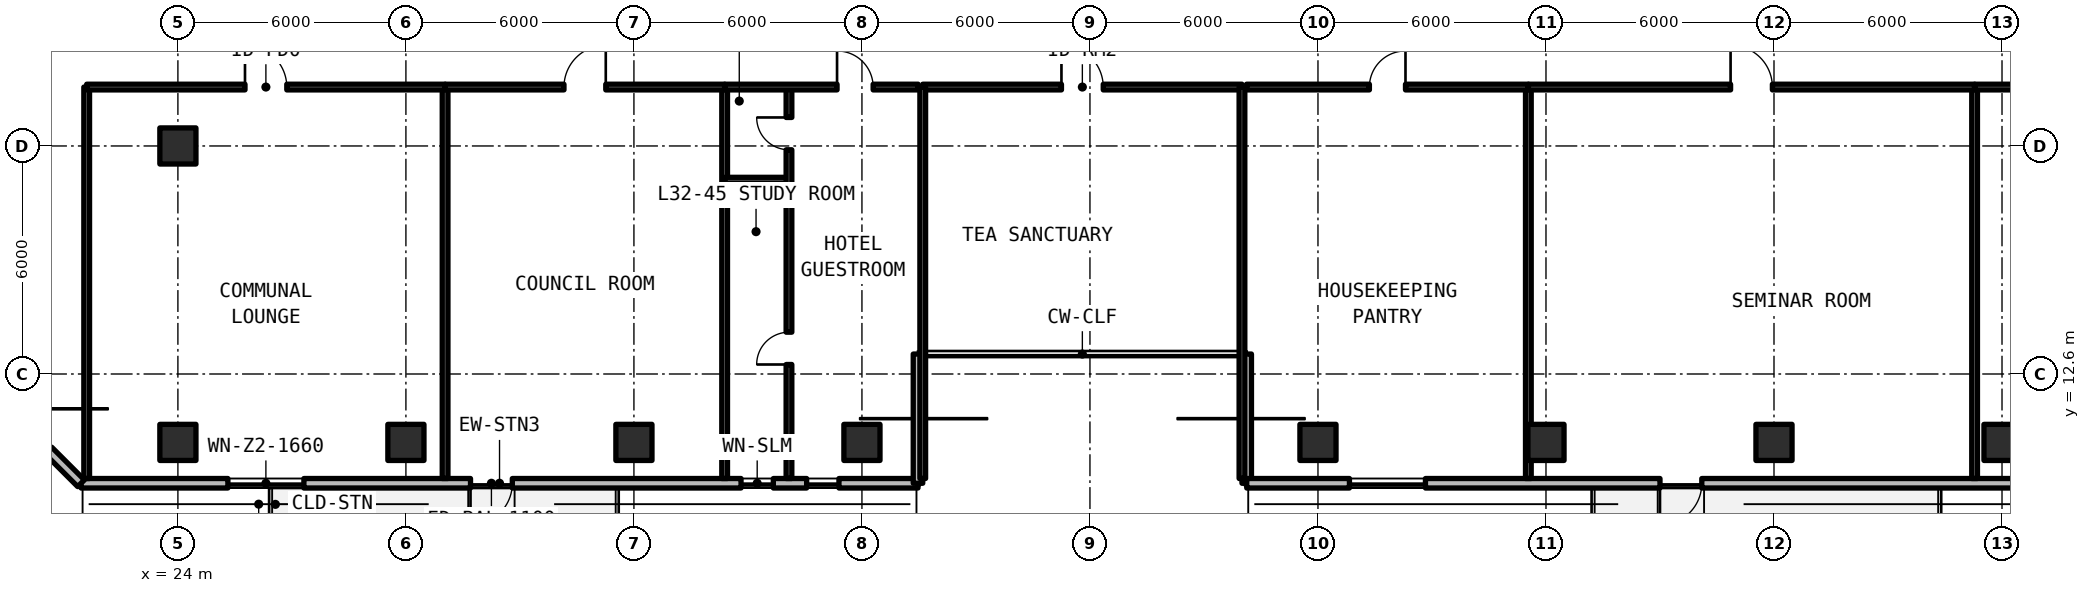
"""IFC4 building model, lengths in metres.
Left out: names, types, materials, properties, quantities, classifications, styles, units other than length and angle.
Written with IfcOpenShell. Run it as: python <this file> out.ifc"""

import sys

from ifc_helpers import new_model, si_unit, direction, frame, frame_2d, origin, origin_2d, place, context, subcontext, project, spatial, rectangle, extrude, element, fill, save


model = new_model("IFC4")
c1 = context("Model", 3, precision=1e-05, world=origin(), true_north=direction((0.0, 1.0)))
c2 = subcontext(c1, "Body", "Model", "MODEL_VIEW")
j1 = project(units=[si_unit("LENGTHUNIT", "METRE"), si_unit("PLANEANGLEUNIT", "RADIAN")], contexts=[c1])
p1 = place(None, origin())
s1 = spatial("IfcSite", under=j1, at=p1, CompositionType="ELEMENT")
p2 = place(p1, origin())
s2 = spatial("IfcBuilding", under=s1, at=p2, CompositionType="ELEMENT")
p3 = place(p2, frame((0.0, 0.0, 115.83)))
s3 = spatial("IfcBuildingStorey", under=s2, at=p3, CompositionType="ELEMENT", Elevation=115.83)
for number, where, z_axis, x_axis in (
    (1, (24.0, 18.6, 0.0), (0.0, 0.0, 1.0), (1.0, 0.0, 0.0)),
    (2, (24.0, 10.8, 0.0), (0.0, 0.0, 1.0), (1.0, 0.0, 0.0)),
    (3, (30.0, 10.8, 0.0), (0.0, 0.0, 1.0), (1.0, 0.0, 0.0)),
    (4, (36.0, 10.8, 0.0), (0.0, 0.0, 1.0), (1.0, 0.0, 0.0)),
    (5, (42.0, 10.8, 0.0), (0.0, 0.0, 1.0), (1.0, 0.0, 0.0)),
    (6, (54.0, 10.8, 0.0), (0.0, 0.0, 1.0), (1.0, 0.0, 0.0)),
    (7, (60.0, 10.8, 0.0), (0.0, 0.0, 1.0), (1.0, 0.0, 0.0)),
    (8, (66.0, 10.8, 0.0), (0.0, 0.0, 1.0), (1.0, 0.0, 0.0)),
    (9, (72.0, 10.8, 0.0), (0.0, 0.0, 1.0), (1.0, 0.0, 0.0)),
):
    element("IfcColumn", number, at=place(p3, frame(where, z_axis=z_axis, x_axis=x_axis)), inside=s3, PredefinedType="COLUMN", context=c2, shape_type="SweptSolid", body=[
        extrude(rectangle(XDim=0.95, YDim=0.95, at=origin_2d()), origin(), (0.0, 0.0, 1.0), 3.63),
    ])
p4 = place(p3, frame((21.452, 9.725, 0.0), z_axis=(0.0, 0.0, 1.0), x_axis=(1.0, 0.0, 0.0)))
e10 = element("IfcWall", 10, at=p4, inside=s3, PredefinedType="SOLIDWALL", context=c2, shape_type="SweptSolid", body=[
    extrude(rectangle(XDim=22.023, YDim=0.25, at=frame_2d((11.012, 0.0))), origin(), (0.0, 0.0, 1.0), 3.41),
])
p5 = place(p4, frame((10.248, 0.0, 0.0)))
e11 = element("IfcOpeningElement", 11, at=p5, cuts=e10, PredefinedType="OPENING", context=c2, shape_type="SweptSolid", body=[
    extrude(rectangle(XDim=1.1, YDim=2.15, at=frame_2d((0.55, 1.075))), frame((0.0, 0.135, 0.0), z_axis=(0.0, -1.0, 0.0), x_axis=(1.0, 0.0, 0.0)), (0.0, 0.0, 1.0), 0.27),
])
p6 = place(p4, frame((3.864, 0.0, 0.78)))
e12 = element("IfcOpeningElement", 12, at=p6, cuts=e10, PredefinedType="OPENING", context=c2, shape_type="SweptSolid", body=[
    extrude(rectangle(XDim=2.0, YDim=1.66, at=frame_2d((1.0, 0.83))), frame((0.0, 0.135, 0.0), z_axis=(0.0, -1.0, 0.0), x_axis=(1.0, 0.0, 0.0)), (0.0, 0.0, 1.0), 0.27),
])
p7 = place(p4, frame((17.367, 0.0, 0.78)))
e13 = element("IfcOpeningElement", 13, at=p7, cuts=e10, PredefinedType="OPENING", context=c2, shape_type="SweptSolid", body=[
    extrude(rectangle(XDim=0.85, YDim=1.65, at=frame_2d((0.425, 0.825))), frame((0.0, 0.135, 0.0), z_axis=(0.0, -1.0, 0.0), x_axis=(1.0, 0.0, 0.0)), (0.0, 0.0, 1.0), 0.27),
])
p8 = place(p4, frame((19.093, 0.0, 0.78)))
e14 = element("IfcOpeningElement", 14, at=p8, cuts=e10, PredefinedType="OPENING", context=c2, shape_type="SweptSolid", body=[
    extrude(rectangle(XDim=0.85, YDim=1.65, at=frame_2d((0.425, 0.825))), frame((0.0, 0.135, 0.0), z_axis=(0.0, -1.0, 0.0), x_axis=(1.0, 0.0, 0.0)), (0.0, 0.0, 1.0), 0.27),
])
for number, where, z_axis, x_axis in (
    (15, (43.475, 9.725, 0.0), (0.0, 0.0, 1.0), (0.0, 1.0, 0.0)),
    (16, (52.125, 13.125, 0.0), (0.0, 0.0, 1.0), (0.0, -1.0, 0.0)),
):
    element("IfcWall", number, at=place(p3, frame(where, z_axis=z_axis, x_axis=x_axis)), inside=s3, PredefinedType="SOLIDWALL", context=c2, shape_type="SweptSolid", body=[
        extrude(rectangle(XDim=3.4, YDim=0.25, at=frame_2d((1.7, 0.0))), origin(), (0.0, 0.0, 1.0), 3.41),
    ])
p9 = place(p3, frame((52.125, 9.725, 0.0), z_axis=(0.0, 0.0, 1.0), x_axis=(1.0, 0.0, 0.0)))
e17 = element("IfcWall", 17, at=p9, inside=s3, PredefinedType="SOLIDWALL", context=c2, shape_type="SweptSolid", body=[
    extrude(rectangle(XDim=44.023, YDim=0.25, at=frame_2d((22.012, 0.0))), origin(), (0.0, 0.0, 1.0), 3.41),
])
p10 = place(p9, frame((10.875, 0.0, 0.0)))
e18 = element("IfcOpeningElement", 18, at=p10, cuts=e17, PredefinedType="OPENING", context=c2, shape_type="SweptSolid", body=[
    extrude(rectangle(XDim=1.1, YDim=2.15, at=frame_2d((0.55, 1.075))), frame((0.0, 0.135, 0.0), z_axis=(0.0, -1.0, 0.0), x_axis=(1.0, 0.0, 0.0)), (0.0, 0.0, 1.0), 0.27),
])
p11 = place(p9, frame((22.975, 0.0, 0.0)))
e19 = element("IfcOpeningElement", 19, at=p11, cuts=e17, PredefinedType="OPENING", context=c2, shape_type="SweptSolid", body=[
    extrude(rectangle(XDim=1.1, YDim=2.15, at=frame_2d((0.55, 1.075))), frame((0.0, 0.135, 0.0), z_axis=(0.0, -1.0, 0.0), x_axis=(1.0, 0.0, 0.0)), (0.0, 0.0, 1.0), 0.27),
])
p12 = place(p9, frame((35.075, 0.0, 0.0)))
e20 = element("IfcOpeningElement", 20, at=p12, cuts=e17, PredefinedType="OPENING", context=c2, shape_type="SweptSolid", body=[
    extrude(rectangle(XDim=1.1, YDim=2.15, at=frame_2d((0.55, 1.075))), frame((0.0, 0.135, 0.0), z_axis=(0.0, -1.0, 0.0), x_axis=(1.0, 0.0, 0.0)), (0.0, 0.0, 1.0), 0.27),
])
p13 = place(p9, frame((2.703, 0.0, 0.78)))
e21 = element("IfcOpeningElement", 21, at=p13, cuts=e17, PredefinedType="OPENING", context=c2, shape_type="SweptSolid", body=[
    extrude(rectangle(XDim=2.0, YDim=1.66, at=frame_2d((1.0, 0.83))), frame((0.0, 0.135, 0.0), z_axis=(0.0, -1.0, 0.0), x_axis=(1.0, 0.0, 0.0)), (0.0, 0.0, 1.0), 0.27),
])
p14 = place(p9, frame((39.973, 0.0, 0.78)))
e22 = element("IfcOpeningElement", 22, at=p14, cuts=e17, PredefinedType="OPENING", context=c2, shape_type="SweptSolid", body=[
    extrude(rectangle(XDim=2.0, YDim=1.66, at=frame_2d((1.0, 0.83))), frame((0.0, 0.135, 0.0), z_axis=(0.0, -1.0, 0.0), x_axis=(1.0, 0.0, 0.0)), (0.0, 0.0, 1.0), 0.27),
])
p15 = place(p3, frame((17.325, 13.852, 0.0), z_axis=(0.0, 0.0, 1.0), x_axis=(0.707127696864, -0.70708586489, 0.0)))
e23 = element("IfcWall", 23, at=p15, inside=s3, PredefinedType="SOLIDWALL", context=c2, shape_type="SweptSolid", body=[
    extrude(rectangle(XDim=5.836, YDim=0.25, at=frame_2d((2.918, 0.0))), origin(), (0.0, 0.0, 1.0), 3.41),
])
p16 = place(p15, frame((1.218, 0.0, 0.78)))
e24 = element("IfcOpeningElement", 24, at=p16, cuts=e23, PredefinedType="OPENING", context=c2, shape_type="SweptSolid", body=[
    extrude(rectangle(XDim=3.4, YDim=1.66, at=frame_2d((1.7, 0.83))), frame((0.0, 0.135, 0.0), z_axis=(0.0, -1.0, 0.0), x_axis=(1.0, 0.0, 0.0)), (0.0, 0.0, 1.0), 0.27),
])
p17 = place(p3, frame((43.6, 20.15, 0.0), z_axis=(0.0, 0.0, 1.0), x_axis=(1.0, 0.0, 0.0)))
e25 = element("IfcWall", 25, at=p17, inside=s3, PredefinedType="SOLIDWALL", context=c2, shape_type="SweptSolid", body=[
    extrude(rectangle(XDim=8.4, YDim=0.15, at=frame_2d((4.2, 0.0))), origin(), (0.0, 0.0, 1.0), 2.63),
])
p18 = place(p17, frame((3.65, 0.0, 0.0)))
e26 = element("IfcOpeningElement", 26, at=p18, cuts=e25, PredefinedType="OPENING", context=c2, shape_type="SweptSolid", body=[
    extrude(rectangle(XDim=1.1, YDim=2.15, at=frame_2d((0.55, 1.075))), frame((0.0, 0.085, 0.0), z_axis=(0.0, -1.0, 0.0), x_axis=(1.0, 0.0, 0.0)), (0.0, 0.0, 1.0), 0.17),
])
for number, where, z_axis, x_axis in (
    (27, (43.6, 9.85, 0.0), (0.0, 0.0, 1.0), (0.0, 1.0, 0.0)),
    (28, (52.0, 9.85, 0.0), (0.0, 0.0, 1.0), (0.0, 1.0, 0.0)),
    (29, (21.6, 9.85, 0.0), (0.0, 0.0, 1.0), (0.0, 1.0, 0.0)),
    (30, (31.031, 9.85, 0.0), (0.0, 0.0, 1.0), (0.0, 1.0, 0.0)),
):
    element("IfcWall", number, at=place(p3, frame(where, z_axis=z_axis, x_axis=x_axis)), inside=s3, PredefinedType="SOLIDWALL", context=c2, shape_type="SweptSolid", body=[
        extrude(rectangle(XDim=10.3, YDim=0.15, at=frame_2d((5.15, 0.0))), origin(), (0.0, 0.0, 1.0), 2.63),
    ])
p19 = place(p3, frame((21.6, 20.15, 0.0), z_axis=(0.0, 0.0, 1.0), x_axis=(1.0, 0.0, 0.0)))
e31 = element("IfcWall", 31, at=p19, inside=s3, PredefinedType="SOLIDWALL", context=c2, shape_type="SweptSolid", body=[
    extrude(rectangle(XDim=9.431, YDim=0.15, at=frame_2d((4.715, 0.0))), origin(), (0.0, 0.0, 1.0), 2.63),
])
p20 = place(p19, frame((4.166, 0.0, 0.0)))
e32 = element("IfcOpeningElement", 32, at=p20, cuts=e31, PredefinedType="OPENING", context=c2, shape_type="SweptSolid", body=[
    extrude(rectangle(XDim=1.1, YDim=2.15, at=frame_2d((0.55, 1.075))), frame((0.0, 0.085, 0.0), z_axis=(0.0, -1.0, 0.0), x_axis=(1.0, 0.0, 0.0)), (0.0, 0.0, 1.0), 0.17),
])
p21 = place(p3, frame((38.387, 9.85, 0.0), z_axis=(0.0, 0.0, 1.0), x_axis=(0.0, 1.0, 0.0)))
e33 = element("IfcWall", 33, at=p21, inside=s3, PredefinedType="SOLIDWALL", context=c2, shape_type="SweptSolid", body=[
    extrude(rectangle(XDim=10.3, YDim=0.15, at=frame_2d((5.15, 0.0))), origin(), (0.0, 0.0, 1.0), 2.63),
])
p22 = place(p3, frame((31.031, 20.15, 0.0), z_axis=(0.0, 0.0, 1.0), x_axis=(1.0, 0.0, 0.0)))
e34 = element("IfcWall", 34, at=p22, inside=s3, PredefinedType="SOLIDWALL", context=c2, shape_type="SweptSolid", body=[
    extrude(rectangle(XDim=7.356, YDim=0.15, at=frame_2d((3.678, 0.0))), origin(), (0.0, 0.0, 1.0), 2.63),
])
p23 = place(p22, frame((3.128, 0.0, 0.0)))
e35 = element("IfcOpeningElement", 35, at=p23, cuts=e34, PredefinedType="OPENING", context=c2, shape_type="SweptSolid", body=[
    extrude(rectangle(XDim=1.1, YDim=2.15, at=frame_2d((0.55, 1.075))), frame((0.0, 0.085, 0.0), z_axis=(0.0, -1.0, 0.0), x_axis=(1.0, 0.0, 0.0)), (0.0, 0.0, 1.0), 0.17),
])
p24 = place(p3, frame((38.387, 17.7, 0.0), z_axis=(0.0, 0.0, 1.0), x_axis=(1.0, 0.0, 0.0)))
e36 = element("IfcWall", 36, at=p24, inside=s3, PredefinedType="PARTITIONING", context=c2, shape_type="SweptSolid", body=[
    extrude(rectangle(XDim=1.693, YDim=0.15, at=frame_2d((0.846, 0.0))), origin(), (0.0, 0.0, 1.0), 2.63),
])
p25 = place(p3, frame((40.08, 9.85, 0.0), z_axis=(0.0, 0.0, 1.0), x_axis=(0.0, 1.0, 0.0)))
e37 = element("IfcWall", 37, at=p25, inside=s3, PredefinedType="PARTITIONING", context=c2, shape_type="SweptSolid", body=[
    extrude(rectangle(XDim=10.3, YDim=0.15, at=frame_2d((5.15, 0.0))), origin(), (0.0, 0.0, 1.0), 2.63),
])
p26 = place(p25, frame((3.0, 0.0, 0.0)))
e38 = element("IfcOpeningElement", 38, at=p26, cuts=e37, PredefinedType="OPENING", context=c2, shape_type="SweptSolid", body=[
    extrude(rectangle(XDim=0.85, YDim=2.1, at=frame_2d((0.425, 1.05))), frame((0.0, 0.085, 0.0), z_axis=(0.0, -1.0, 0.0), x_axis=(1.0, 0.0, 0.0)), (0.0, 0.0, 1.0), 0.17),
])
p27 = place(p25, frame((8.65, 0.0, 0.0)))
e39 = element("IfcOpeningElement", 39, at=p27, cuts=e37, PredefinedType="OPENING", context=c2, shape_type="SweptSolid", body=[
    extrude(rectangle(XDim=0.85, YDim=2.1, at=frame_2d((0.425, 1.05))), frame((0.0, 0.085, 0.0), z_axis=(0.0, -1.0, 0.0), x_axis=(1.0, 0.0, 0.0)), (0.0, 0.0, 1.0), 0.17),
])
p28 = place(p3, frame((38.387, 20.15, 0.0), z_axis=(0.0, 0.0, 1.0), x_axis=(1.0, 0.0, 0.0)))
e40 = element("IfcWall", 40, at=p28, inside=s3, PredefinedType="SOLIDWALL", context=c2, shape_type="SweptSolid", body=[
    extrude(rectangle(XDim=5.093, YDim=0.15, at=frame_2d((2.546, 0.0))), origin(), (0.0, 0.0, 1.0), 2.63),
])
p29 = place(p28, frame((2.958, 0.0, 0.0)))
e41 = element("IfcOpeningElement", 41, at=p29, cuts=e40, PredefinedType="OPENING", context=c2, shape_type="SweptSolid", body=[
    extrude(rectangle(XDim=0.95, YDim=2.15, at=frame_2d((0.475, 1.075))), frame((0.0, 0.085, 0.0), z_axis=(0.0, -1.0, 0.0), x_axis=(1.0, 0.0, 0.0)), (0.0, 0.0, 1.0), 0.17),
])
p30 = place(p3, frame((59.536, 9.85, 0.0), z_axis=(0.0, 0.0, 1.0), x_axis=(0.0, 1.0, 0.0)))
e42 = element("IfcWall", 42, at=p30, inside=s3, PredefinedType="SOLIDWALL", context=c2, shape_type="SweptSolid", body=[
    extrude(rectangle(XDim=10.3, YDim=0.15, at=frame_2d((5.15, 0.0))), origin(), (0.0, 0.0, 1.0), 2.63),
])
p31 = place(p3, frame((52.12, 20.15, 0.0), z_axis=(0.0, 0.0, 1.0), x_axis=(1.0, 0.0, 0.0)))
e43 = element("IfcWall", 43, at=p31, inside=s3, PredefinedType="SOLIDWALL", context=c2, shape_type="SweptSolid", body=[
    extrude(rectangle(XDim=7.416, YDim=0.15, at=frame_2d((3.708, 0.0))), origin(), (0.0, 0.0, 1.0), 2.63),
])
p32 = place(p31, frame((3.233, 0.0, 0.0)))
e44 = element("IfcOpeningElement", 44, at=p32, cuts=e43, PredefinedType="OPENING", context=c2, shape_type="SweptSolid", body=[
    extrude(rectangle(XDim=0.95, YDim=2.15, at=frame_2d((0.475, 1.075))), frame((0.0, 0.085, 0.0), z_axis=(0.0, -1.0, 0.0), x_axis=(1.0, 0.0, 0.0)), (0.0, 0.0, 1.0), 0.17),
])
p33 = place(p3, frame((71.279, 9.85, 0.0), z_axis=(0.0, 0.0, 1.0), x_axis=(0.0, 1.0, 0.0)))
e45 = element("IfcWall", 45, at=p33, inside=s3, PredefinedType="SOLIDWALL", context=c2, shape_type="SweptSolid", body=[
    extrude(rectangle(XDim=10.3, YDim=0.15, at=frame_2d((5.15, 0.0))), origin(), (0.0, 0.0, 1.0), 2.63),
])
p34 = place(p3, frame((59.536, 20.15, 0.0), z_axis=(0.0, 0.0, 1.0), x_axis=(1.0, 0.0, 0.0)))
e46 = element("IfcWall", 46, at=p34, inside=s3, PredefinedType="SOLIDWALL", context=c2, shape_type="SweptSolid", body=[
    extrude(rectangle(XDim=11.742, YDim=0.15, at=frame_2d((5.871, 0.0))), origin(), (0.0, 0.0, 1.0), 2.63),
])
p35 = place(p34, frame((5.321, 0.0, 0.0)))
e47 = element("IfcOpeningElement", 47, at=p35, cuts=e46, PredefinedType="OPENING", context=c2, shape_type="SweptSolid", body=[
    extrude(rectangle(XDim=1.1, YDim=2.15, at=frame_2d((0.55, 1.075))), frame((0.0, 0.085, 0.0), z_axis=(0.0, -1.0, 0.0), x_axis=(1.0, 0.0, 0.0)), (0.0, 0.0, 1.0), 0.17),
])
p36 = place(p3, frame((71.279, 20.15, 0.0), z_axis=(0.0, 0.0, 1.0), x_axis=(1.0, 0.0, 0.0)))
e48 = element("IfcWall", 48, at=p36, inside=s3, PredefinedType="SOLIDWALL", context=c2, shape_type="SweptSolid", body=[
    extrude(rectangle(XDim=12.67, YDim=0.15, at=frame_2d((6.335, 0.0))), origin(), (0.0, 0.0, 1.0), 2.63),
])
p37 = place(p36, frame((5.785, 0.0, 0.0)))
e49 = element("IfcOpeningElement", 49, at=p37, cuts=e48, PredefinedType="OPENING", context=c2, shape_type="SweptSolid", body=[
    extrude(rectangle(XDim=1.1, YDim=2.15, at=frame_2d((0.55, 1.075))), frame((0.0, 0.085, 0.0), z_axis=(0.0, -1.0, 0.0), x_axis=(1.0, 0.0, 0.0)), (0.0, 0.0, 1.0), 0.17),
])
p38 = place(p5, frame((1.1, 0.0, 0.0), z_axis=(0.0, 0.0, 1.0), x_axis=(-1.0, 0.0, 0.0)))
e50 = element("IfcDoor", 50, at=p38, inside=s3, OperationType="SINGLE_SWING_RIGHT", PredefinedType="DOOR", context=c2, shape_type="SweptSolid", body=[
    extrude(rectangle(XDim=1.1, YDim=2.15, at=frame_2d((0.55, 1.075))), frame((0.0, 0.025, 0.0), z_axis=(0.0, -1.0, 0.0), x_axis=(1.0, 0.0, 0.0)), (0.0, 0.0, 1.0), 0.05),
])
fill(e11, e50)
p39 = place(p6, origin())
e51 = element("IfcWindow", 51, at=p39, inside=s3, PartitioningType="SINGLE_PANEL", PredefinedType="WINDOW", context=c2, shape_type="SweptSolid", body=[
    extrude(rectangle(XDim=2.0, YDim=1.66, at=frame_2d((1.0, 0.83))), frame((0.0, 0.03, 0.0), z_axis=(0.0, -1.0, 0.0), x_axis=(1.0, 0.0, 0.0)), (0.0, 0.0, 1.0), 0.06),
])
fill(e12, e51)
p40 = place(p7, origin())
e52 = element("IfcWindow", 52, at=p40, inside=s3, PartitioningType="SINGLE_PANEL", PredefinedType="WINDOW", context=c2, shape_type="SweptSolid", body=[
    extrude(rectangle(XDim=0.85, YDim=1.65, at=frame_2d((0.425, 0.825))), frame((0.0, 0.03, 0.0), z_axis=(0.0, -1.0, 0.0), x_axis=(1.0, 0.0, 0.0)), (0.0, 0.0, 1.0), 0.06),
])
fill(e13, e52)
p41 = place(p8, origin())
e53 = element("IfcWindow", 53, at=p41, inside=s3, PartitioningType="SINGLE_PANEL", PredefinedType="WINDOW", context=c2, shape_type="SweptSolid", body=[
    extrude(rectangle(XDim=0.85, YDim=1.65, at=frame_2d((0.425, 0.825))), frame((0.0, 0.03, 0.0), z_axis=(0.0, -1.0, 0.0), x_axis=(1.0, 0.0, 0.0)), (0.0, 0.0, 1.0), 0.06),
])
fill(e14, e53)
p42 = place(p10, frame((1.1, 0.0, 0.0), z_axis=(0.0, 0.0, 1.0), x_axis=(-1.0, 0.0, 0.0)))
e54 = element("IfcDoor", 54, at=p42, inside=s3, OperationType="SINGLE_SWING_LEFT", PredefinedType="DOOR", context=c2, shape_type="SweptSolid", body=[
    extrude(rectangle(XDim=1.1, YDim=2.15, at=frame_2d((0.55, 1.075))), frame((0.0, 0.025, 0.0), z_axis=(0.0, -1.0, 0.0), x_axis=(1.0, 0.0, 0.0)), (0.0, 0.0, 1.0), 0.05),
])
fill(e18, e54)
p43 = place(p13, origin())
e55 = element("IfcWindow", 55, at=p43, inside=s3, PartitioningType="SINGLE_PANEL", PredefinedType="WINDOW", context=c2, shape_type="SweptSolid", body=[
    extrude(rectangle(XDim=2.0, YDim=1.66, at=frame_2d((1.0, 0.83))), frame((0.0, 0.03, 0.0), z_axis=(0.0, -1.0, 0.0), x_axis=(1.0, 0.0, 0.0)), (0.0, 0.0, 1.0), 0.06),
])
fill(e21, e55)
p44 = place(p18, origin())
e56 = element("IfcDoor", 56, at=p44, inside=s3, OperationType="SINGLE_SWING_LEFT", PredefinedType="DOOR", context=c2, shape_type="SweptSolid", body=[
    extrude(rectangle(XDim=1.1, YDim=2.15, at=frame_2d((0.55, 1.075))), frame((0.0, 0.025, 0.0), z_axis=(0.0, -1.0, 0.0), x_axis=(1.0, 0.0, 0.0)), (0.0, 0.0, 1.0), 0.05),
])
fill(e26, e56)
p45 = place(p20, origin())
e57 = element("IfcDoor", 57, at=p45, inside=s3, OperationType="SINGLE_SWING_LEFT", PredefinedType="DOOR", context=c2, shape_type="SweptSolid", body=[
    extrude(rectangle(XDim=1.1, YDim=2.15, at=frame_2d((0.55, 1.075))), frame((0.0, 0.025, 0.0), z_axis=(0.0, -1.0, 0.0), x_axis=(1.0, 0.0, 0.0)), (0.0, 0.0, 1.0), 0.05),
])
fill(e32, e57)
p46 = place(p23, origin())
e58 = element("IfcDoor", 58, at=p46, inside=s3, OperationType="SINGLE_SWING_RIGHT", PredefinedType="DOOR", context=c2, shape_type="SweptSolid", body=[
    extrude(rectangle(XDim=1.1, YDim=2.15, at=frame_2d((0.55, 1.075))), frame((0.0, 0.025, 0.0), z_axis=(0.0, -1.0, 0.0), x_axis=(1.0, 0.0, 0.0)), (0.0, 0.0, 1.0), 0.05),
])
fill(e35, e58)
p47 = place(p26, origin())
e59 = element("IfcDoor", 59, at=p47, inside=s3, OperationType="SINGLE_SWING_LEFT", PredefinedType="DOOR", context=c2, shape_type="SweptSolid", body=[
    extrude(rectangle(XDim=0.85, YDim=2.1, at=frame_2d((0.425, 1.05))), frame((0.0, 0.025, 0.0), z_axis=(0.0, -1.0, 0.0), x_axis=(1.0, 0.0, 0.0)), (0.0, 0.0, 1.0), 0.05),
])
fill(e38, e59)
p48 = place(p27, origin())
e60 = element("IfcDoor", 60, at=p48, inside=s3, OperationType="SINGLE_SWING_RIGHT", PredefinedType="DOOR", context=c2, shape_type="SweptSolid", body=[
    extrude(rectangle(XDim=0.85, YDim=2.1, at=frame_2d((0.425, 1.05))), frame((0.0, 0.025, 0.0), z_axis=(0.0, -1.0, 0.0), x_axis=(1.0, 0.0, 0.0)), (0.0, 0.0, 1.0), 0.05),
])
fill(e39, e60)
p49 = place(p29, origin())
e61 = element("IfcDoor", 61, at=p49, inside=s3, OperationType="SINGLE_SWING_LEFT", PredefinedType="DOOR", context=c2, shape_type="SweptSolid", body=[
    extrude(rectangle(XDim=0.95, YDim=2.15, at=frame_2d((0.475, 1.075))), frame((0.0, 0.025, 0.0), z_axis=(0.0, -1.0, 0.0), x_axis=(1.0, 0.0, 0.0)), (0.0, 0.0, 1.0), 0.05),
])
fill(e41, e61)
p50 = place(p32, origin())
e62 = element("IfcDoor", 62, at=p50, inside=s3, OperationType="SINGLE_SWING_RIGHT", PredefinedType="DOOR", context=c2, shape_type="SweptSolid", body=[
    extrude(rectangle(XDim=0.95, YDim=2.15, at=frame_2d((0.475, 1.075))), frame((0.0, 0.025, 0.0), z_axis=(0.0, -1.0, 0.0), x_axis=(1.0, 0.0, 0.0)), (0.0, 0.0, 1.0), 0.05),
])
fill(e44, e62)
p51 = place(p35, origin())
e63 = element("IfcDoor", 63, at=p51, inside=s3, OperationType="SINGLE_SWING_LEFT", PredefinedType="DOOR", context=c2, shape_type="SweptSolid", body=[
    extrude(rectangle(XDim=1.1, YDim=2.15, at=frame_2d((0.55, 1.075))), frame((0.0, 0.025, 0.0), z_axis=(0.0, -1.0, 0.0), x_axis=(1.0, 0.0, 0.0)), (0.0, 0.0, 1.0), 0.05),
])
fill(e47, e63)
save(model, sys.argv[1])
